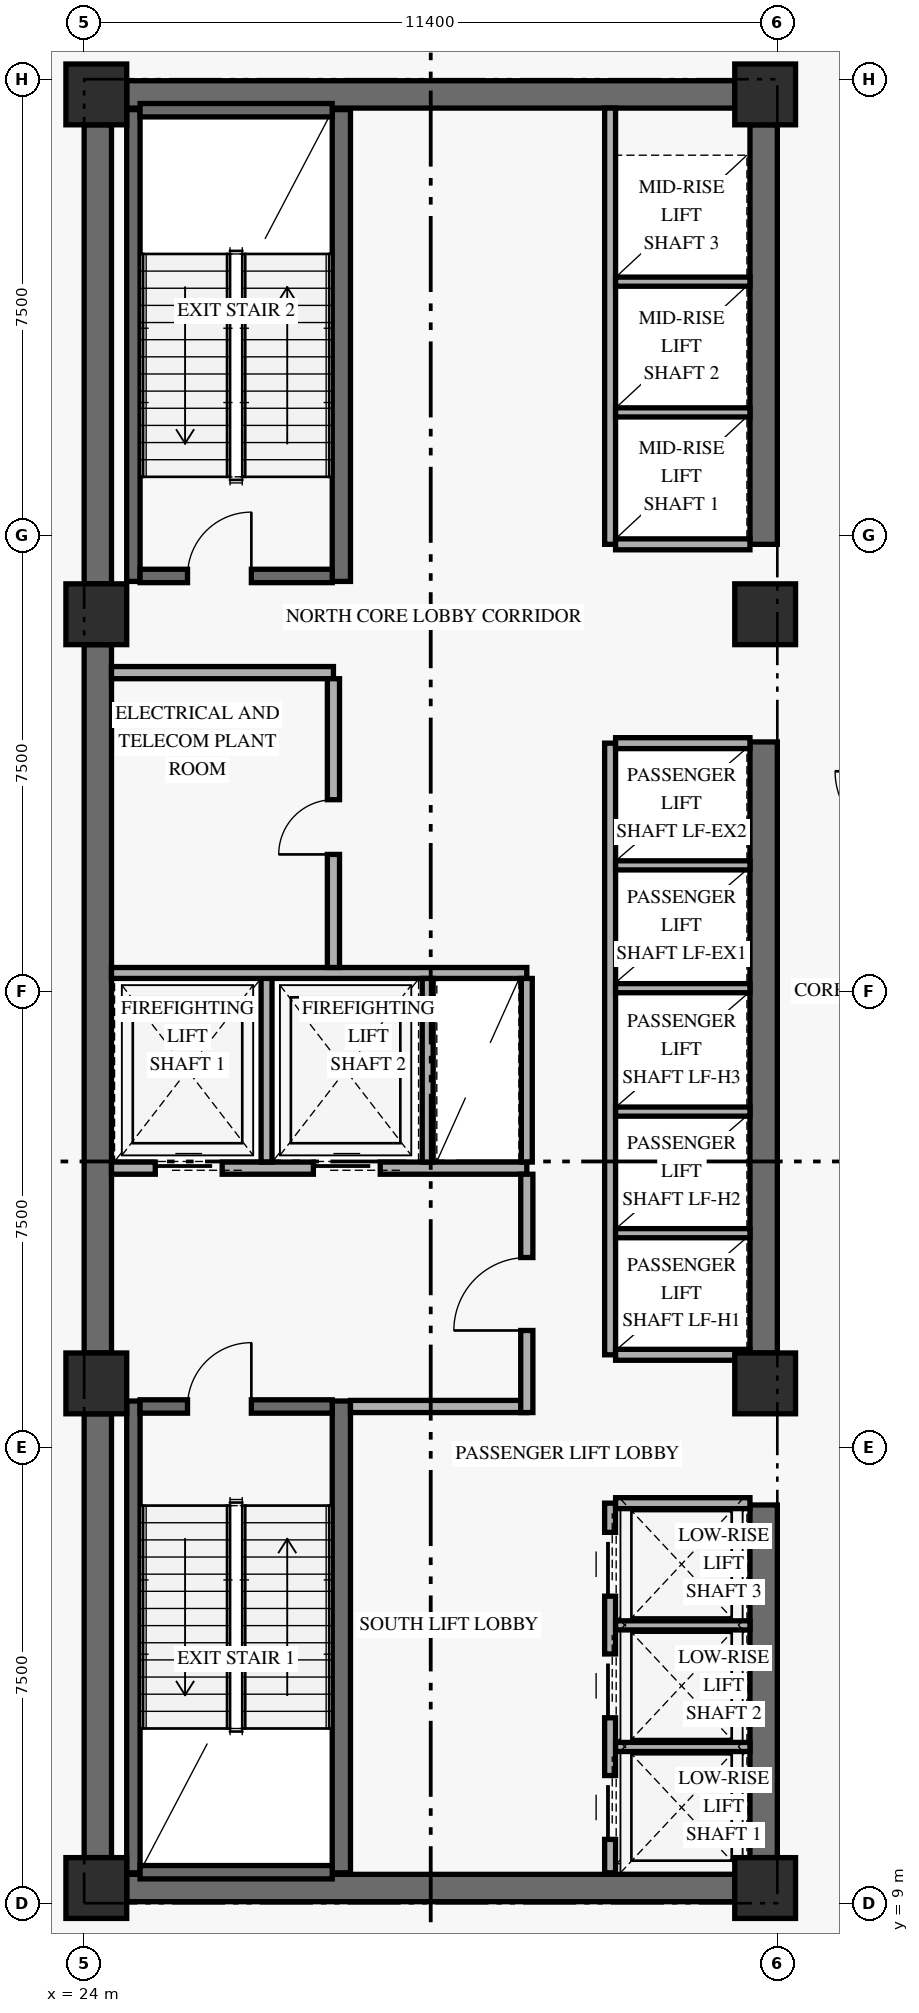
"""IFC4 building model, lengths in metres.
Left out: names, types, materials, properties, quantities, classifications, styles, units other than length and angle.
Written with IfcOpenShell. Run it as: python <this file> out.ifc"""

import sys

from ifc_helpers import new_model, si_unit, direction, frame, frame_2d, origin, origin_2d, place, context, subcontext, project, spatial, rectangle, extrude, element, fill, save


model = new_model("IFC4")
c1 = context("Model", 3, precision=1e-05, world=origin(), true_north=direction((0.0, 1.0)))
c2 = subcontext(c1, "Body", "Model", "MODEL_VIEW")
j1 = project(units=[si_unit("LENGTHUNIT", "METRE"), si_unit("PLANEANGLEUNIT", "RADIAN")], contexts=[c1])
p1 = place(None, origin())
s1 = spatial("IfcSite", under=j1, at=p1, CompositionType="ELEMENT")
p2 = place(p1, origin())
s2 = spatial("IfcBuilding", under=s1, at=p2, CompositionType="ELEMENT")
p3 = place(p2, frame((0.0, 0.0, 19.2)))
s3 = spatial("IfcBuildingStorey", under=s2, at=p3, CompositionType="ELEMENT", Elevation=19.2)
p4 = place(p3, frame((24.225, 9.75, 0.0), z_axis=(0.0, 0.0, 1.0), x_axis=(0.0, 1.0, 0.0)))
e1 = element("IfcWall", 1, at=p4, inside=s3, PredefinedType="SHEAR", context=c2, shape_type="SweptSolid", body=[
    extrude(rectangle(XDim=7.3, YDim=0.45, at=frame_2d((3.65, 0.0))), origin(), (0.0, 0.0, 1.0), 3.73),
])
p5 = place(p3, frame((24.225, 18.05, 0.0), z_axis=(0.0, 0.0, 1.0), x_axis=(0.0, 1.0, 0.0)))
e2 = element("IfcWall", 2, at=p5, inside=s3, PredefinedType="SHEAR", context=c2, shape_type="SweptSolid", body=[
    extrude(rectangle(XDim=11.65, YDim=0.45, at=frame_2d((5.825, 0.0))), origin(), (0.0, 0.0, 1.0), 3.73),
])
p6 = place(p3, frame((24.225, 30.7, 0.0), z_axis=(0.0, 0.0, 1.0), x_axis=(0.0, 1.0, 0.0)))
e3 = element("IfcWall", 3, at=p6, inside=s3, PredefinedType="SHEAR", context=c2, shape_type="SweptSolid", body=[
    extrude(rectangle(XDim=7.55, YDim=0.45, at=frame_2d((3.775, 0.0))), origin(), (0.0, 0.0, 1.0), 3.73),
])
p7 = place(p3, frame((35.175, 9.75, 0.0), z_axis=(0.0, 0.0, 1.0), x_axis=(0.0, 1.0, 0.0)))
e4 = element("IfcWall", 4, at=p7, inside=s3, PredefinedType="SHEAR", context=c2, shape_type="SweptSolid", body=[
    extrude(rectangle(XDim=5.8, YDim=0.45, at=frame_2d((2.9, 0.0))), origin(), (0.0, 0.0, 1.0), 3.73),
])
p8 = place(p3, frame((35.175, 18.05, 0.0), z_axis=(0.0, 0.0, 1.0), x_axis=(0.0, 1.0, 0.0)))
e5 = element("IfcWall", 5, at=p8, inside=s3, PredefinedType="SHEAR", context=c2, shape_type="SweptSolid", body=[
    extrude(rectangle(XDim=10.05, YDim=0.45, at=frame_2d((5.025, 0.0))), origin(), (0.0, 0.0, 1.0), 3.73),
])
p9 = place(p3, frame((35.175, 31.35, 0.0), z_axis=(0.0, 0.0, 1.0), x_axis=(0.0, 1.0, 0.0)))
e6 = element("IfcWall", 6, at=p9, inside=s3, PredefinedType="SHEAR", context=c2, shape_type="SweptSolid", body=[
    extrude(rectangle(XDim=6.9, YDim=0.45, at=frame_2d((3.45, 0.0))), origin(), (0.0, 0.0, 1.0), 3.73),
])
for number, where, z_axis, x_axis in (
    (7, (24.7, 9.25, 0.0), (0.0, 0.0, 1.0), (1.0, 0.0, 0.0)),
    (8, (24.7, 38.75, 0.0), (0.0, 0.0, 1.0), (1.0, 0.0, 0.0)),
):
    element("IfcWall", number, at=place(p3, frame(where, z_axis=z_axis, x_axis=x_axis)), inside=s3, PredefinedType="SHEAR", context=c2, shape_type="SweptSolid", body=[
        extrude(rectangle(XDim=10.0, YDim=0.45, at=frame_2d((5.0, 0.0))), origin(), (0.0, 0.0, 1.0), 4.5),
    ])
p10 = place(p3, frame((24.81, 9.5, 0.0), z_axis=(0.0, 0.0, 1.0), x_axis=(0.0, 1.0, 0.0)))
e9 = element("IfcWall", 9, at=p10, inside=s3, PredefinedType="SHEAR", context=c2, shape_type="SweptSolid", body=[
    extrude(rectangle(XDim=7.76, YDim=0.22, at=frame_2d((3.88, 0.0))), origin(), (0.0, 0.0, 1.0), 4.5),
])
p11 = place(p3, frame((28.23, 9.5, 0.0), z_axis=(0.0, 0.0, 1.0), x_axis=(0.0, 1.0, 0.0)))
e10 = element("IfcWall", 10, at=p11, inside=s3, PredefinedType="SHEAR", context=c2, shape_type="SweptSolid", body=[
    extrude(rectangle(XDim=7.76, YDim=0.3, at=frame_2d((3.88, 0.0))), origin(), (0.0, 0.0, 1.0), 4.5),
])
p12 = place(p3, frame((24.92, 9.51, 0.0), z_axis=(0.0, 0.0, 1.0), x_axis=(1.0, 0.0, 0.0)))
e11 = element("IfcWall", 11, at=p12, inside=s3, PredefinedType="SHEAR", context=c2, shape_type="SweptSolid", body=[
    extrude(rectangle(XDim=3.16, YDim=0.22, at=frame_2d((1.58, 0.0))), origin(), (0.0, 0.0, 1.0), 4.5),
])
p13 = place(p3, frame((24.92, 17.17, 0.0), z_axis=(0.0, 0.0, 1.0), x_axis=(1.0, 0.0, 0.0)))
e12 = element("IfcWall", 12, at=p13, inside=s3, PredefinedType="SHEAR", context=c2, shape_type="SweptSolid", body=[
    extrude(rectangle(XDim=3.16, YDim=0.22, at=frame_2d((1.58, 0.0))), origin(), (0.0, 0.0, 1.0), 4.5),
])
p14 = place(p13, frame((0.78, 0.0, 0.0)))
e13 = element("IfcOpeningElement", 13, at=p14, cuts=e12, PredefinedType="OPENING", context=c2, shape_type="SweptSolid", body=[
    extrude(rectangle(XDim=1.05, YDim=2.15, at=frame_2d((0.525, 1.075))), frame((0.0, 0.12, 0.0), z_axis=(0.0, -1.0, 0.0), x_axis=(1.0, 0.0, 0.0)), (0.0, 0.0, 1.0), 0.24),
])
p15 = place(p3, frame((24.81, 30.74, 0.0), z_axis=(0.0, 0.0, 1.0), x_axis=(0.0, 1.0, 0.0)))
e14 = element("IfcWall", 14, at=p15, inside=s3, PredefinedType="SHEAR", context=c2, shape_type="SweptSolid", body=[
    extrude(rectangle(XDim=7.76, YDim=0.22, at=frame_2d((3.88, 0.0))), origin(), (0.0, 0.0, 1.0), 4.5),
])
p16 = place(p3, frame((28.23, 30.74, 0.0), z_axis=(0.0, 0.0, 1.0), x_axis=(0.0, 1.0, 0.0)))
e15 = element("IfcWall", 15, at=p16, inside=s3, PredefinedType="SHEAR", context=c2, shape_type="SweptSolid", body=[
    extrude(rectangle(XDim=7.76, YDim=0.3, at=frame_2d((3.88, 0.0))), origin(), (0.0, 0.0, 1.0), 4.5),
])
p17 = place(p3, frame((24.92, 30.83, 0.0), z_axis=(0.0, 0.0, 1.0), x_axis=(1.0, 0.0, 0.0)))
e16 = element("IfcWall", 16, at=p17, inside=s3, PredefinedType="SHEAR", context=c2, shape_type="SweptSolid", body=[
    extrude(rectangle(XDim=3.16, YDim=0.22, at=frame_2d((1.58, 0.0))), origin(), (0.0, 0.0, 1.0), 4.5),
])
p18 = place(p17, frame((0.78, 0.0, 0.0)))
e17 = element("IfcOpeningElement", 17, at=p18, cuts=e16, PredefinedType="OPENING", context=c2, shape_type="SweptSolid", body=[
    extrude(rectangle(XDim=1.05, YDim=2.15, at=frame_2d((0.525, 1.075))), frame((0.0, 0.12, 0.0), z_axis=(0.0, -1.0, 0.0), x_axis=(1.0, 0.0, 0.0)), (0.0, 0.0, 1.0), 0.24),
])
p19 = place(p3, frame((24.92, 38.49, 0.0), z_axis=(0.0, 0.0, 1.0), x_axis=(1.0, 0.0, 0.0)))
e18 = element("IfcWall", 18, at=p19, inside=s3, PredefinedType="SHEAR", context=c2, shape_type="SweptSolid", body=[
    extrude(rectangle(XDim=3.16, YDim=0.22, at=frame_2d((1.58, 0.0))), origin(), (0.0, 0.0, 1.0), 4.5),
])
for number, where, z_axis, x_axis in (
    (19, (24.2, 9.25, 0.0), (0.0, 0.0, 1.0), (1.0, 0.0, 0.0)),
    (20, (24.2, 17.55, 0.0), (0.0, 0.0, 1.0), (1.0, 0.0, 0.0)),
    (21, (24.2, 30.2, 0.0), (0.0, 0.0, 1.0), (1.0, 0.0, 0.0)),
    (22, (24.2, 38.75, 0.0), (0.0, 0.0, 1.0), (1.0, 0.0, 0.0)),
    (23, (35.2, 9.25, 0.0), (0.0, 0.0, 1.0), (1.0, 0.0, 0.0)),
    (24, (35.2, 17.55, 0.0), (0.0, 0.0, 1.0), (1.0, 0.0, 0.0)),
    (25, (35.2, 30.2, 0.0), (0.0, 0.0, 1.0), (1.0, 0.0, 0.0)),
    (26, (35.2, 38.75, 0.0), (0.0, 0.0, 1.0), (1.0, 0.0, 0.0)),
):
    element("IfcColumn", number, at=place(p3, frame(where, z_axis=z_axis, x_axis=x_axis)), inside=s3, PredefinedType="COLUMN", context=c2, shape_type="SweptSolid", body=[
        extrude(rectangle(XDim=1.0, YDim=1.0, at=origin_2d()), origin(), (0.0, 0.0, 1.0), 4.8),
    ])
p20 = place(p3, frame((24.45, 21.09, 0.0), z_axis=(0.0, 0.0, 1.0), x_axis=(1.0, 0.0, 0.0)))
e27 = element("IfcWall", 27, at=p20, inside=s3, PredefinedType="STANDARD", context=c2, shape_type="SweptSolid", body=[
    extrude(rectangle(XDim=6.83, YDim=0.2, at=frame_2d((3.415, 0.0))), origin(), (0.0, 0.0, 1.0), 4.5),
])
p21 = place(p20, frame((0.72, 0.0, 0.0)))
e28 = element("IfcOpeningElement", 28, at=p21, cuts=e27, PredefinedType="OPENING", context=c2, shape_type="SweptSolid", body=[
    extrude(rectangle(XDim=1.1, YDim=2.2, at=frame_2d((0.55, 1.1))), frame((0.0, 0.11, 0.0), z_axis=(0.0, -1.0, 0.0), x_axis=(1.0, 0.0, 0.0)), (0.0, 0.0, 1.0), 0.22),
])
p22 = place(p20, frame((3.32, 0.0, 0.0)))
e29 = element("IfcOpeningElement", 29, at=p22, cuts=e27, PredefinedType="OPENING", context=c2, shape_type="SweptSolid", body=[
    extrude(rectangle(XDim=1.1, YDim=2.2, at=frame_2d((0.55, 1.1))), frame((0.0, 0.11, 0.0), z_axis=(0.0, -1.0, 0.0), x_axis=(1.0, 0.0, 0.0)), (0.0, 0.0, 1.0), 0.22),
])
p23 = place(p3, frame((28.38, 17.17, 0.0), z_axis=(0.0, 0.0, 1.0), x_axis=(1.0, 0.0, 0.0)))
e30 = element("IfcWall", 30, at=p23, inside=s3, PredefinedType="STANDARD", context=c2, shape_type="SweptSolid", body=[
    extrude(rectangle(XDim=2.9, YDim=0.2, at=frame_2d((1.45, 0.0))), origin(), (0.0, 0.0, 1.0), 4.5),
])
p24 = place(p3, frame((31.28, 17.07, 0.0), z_axis=(0.0, 0.0, 1.0), x_axis=(0.0, 1.0, 0.0)))
e31 = element("IfcWall", 31, at=p24, inside=s3, PredefinedType="STANDARD", context=c2, shape_type="SweptSolid", body=[
    extrude(rectangle(XDim=3.92, YDim=0.2, at=frame_2d((1.96, 0.0))), origin(), (0.0, 0.0, 1.0), 3.555),
])
p25 = place(p24, frame((1.35, 0.0, 0.0)))
e32 = element("IfcOpeningElement", 32, at=p25, cuts=e31, PredefinedType="OPENING", context=c2, shape_type="SweptSolid", body=[
    extrude(rectangle(XDim=1.2, YDim=2.15, at=frame_2d((0.6, 1.075))), frame((0.0, 0.11, 0.0), z_axis=(0.0, -1.0, 0.0), x_axis=(1.0, 0.0, 0.0)), (0.0, 0.0, 1.0), 0.22),
])
p26 = place(p3, frame((27.0, 21.19, 0.0), z_axis=(0.0, 0.0, 1.0), x_axis=(0.0, 1.0, 0.0)))
e33 = element("IfcWall", 33, at=p26, inside=s3, PredefinedType="STANDARD", context=c2, shape_type="SweptSolid", body=[
    extrude(rectangle(XDim=3.11, YDim=0.18, at=frame_2d((1.555, 0.0))), origin(), (0.0, 0.0, 1.0), 4.5),
])
p27 = place(p3, frame((24.45, 24.3, 0.0), z_axis=(0.0, 0.0, 1.0), x_axis=(1.0, 0.0, 0.0)))
e34 = element("IfcWall", 34, at=p27, inside=s3, PredefinedType="STANDARD", context=c2, shape_type="SweptSolid", body=[
    extrude(rectangle(XDim=6.83, YDim=0.18, at=frame_2d((3.415, 0.0))), origin(), (0.0, 0.0, 1.0), 4.5),
])
for number, where, z_axis, x_axis in (
    (35, (29.65, 21.19, 0.0), (0.0, 0.0, 1.0), (0.0, 1.0, 0.0)),
    (36, (31.28, 21.19, 0.0), (0.0, 0.0, 1.0), (0.0, 1.0, 0.0)),
):
    element("IfcWall", number, at=place(p3, frame(where, z_axis=z_axis, x_axis=x_axis)), inside=s3, PredefinedType="STANDARD", context=c2, shape_type="SweptSolid", body=[
        extrude(rectangle(XDim=3.02, YDim=0.18, at=frame_2d((1.51, 0.0))), origin(), (0.0, 0.0, 1.0), 4.5),
    ])
p28 = place(p3, frame((24.45, 29.24, 0.0), z_axis=(0.0, 0.0, 1.0), x_axis=(1.0, 0.0, 0.0)))
e37 = element("IfcWall", 37, at=p28, inside=s3, PredefinedType="STANDARD", context=c2, shape_type="SweptSolid", body=[
    extrude(rectangle(XDim=3.65, YDim=0.2, at=frame_2d((1.825, 0.0))), origin(), (0.0, 0.0, 1.0), 4.5),
])
p29 = place(p3, frame((28.1, 24.39, 0.0), z_axis=(0.0, 0.0, 1.0), x_axis=(0.0, 1.0, 0.0)))
e38 = element("IfcWall", 38, at=p29, inside=s3, PredefinedType="STANDARD", context=c2, shape_type="SweptSolid", body=[
    extrude(rectangle(XDim=4.75, YDim=0.2, at=frame_2d((2.375, 0.0))), origin(), (0.0, 0.0, 1.0), 4.5),
])
p30 = place(p29, frame((1.86, 0.0, 0.0)))
e39 = element("IfcOpeningElement", 39, at=p30, cuts=e38, PredefinedType="OPENING", context=c2, shape_type="SweptSolid", body=[
    extrude(rectangle(XDim=0.9, YDim=2.1, at=frame_2d((0.45, 1.05))), frame((0.0, 0.11, 0.0), z_axis=(0.0, -1.0, 0.0), x_axis=(1.0, 0.0, 0.0)), (0.0, 0.0, 1.0), 0.22),
])
p31 = place(p3, frame((32.65, 9.5, 0.0), z_axis=(0.0, 0.0, 1.0), x_axis=(0.0, 1.0, 0.0)))
e40 = element("IfcWall", 40, at=p31, inside=s3, PredefinedType="STANDARD", context=c2, shape_type="SweptSolid", body=[
    extrude(rectangle(XDim=6.08, YDim=0.18, at=frame_2d((3.04, 0.0))), origin(), (0.0, 0.0, 1.0), 4.5),
])
p32 = place(p31, frame((0.55, 0.0, 0.0)))
e41 = element("IfcOpeningElement", 41, at=p32, cuts=e40, PredefinedType="OPENING", context=c2, shape_type="SweptSolid", body=[
    extrude(rectangle(XDim=1.05, YDim=2.2, at=frame_2d((0.525, 1.1))), frame((0.0, 0.1, 0.0), z_axis=(0.0, -1.0, 0.0), x_axis=(1.0, 0.0, 0.0)), (0.0, 0.0, 1.0), 0.2),
])
p33 = place(p31, frame((2.55, 0.0, 0.0)))
e42 = element("IfcOpeningElement", 42, at=p33, cuts=e40, PredefinedType="OPENING", context=c2, shape_type="SweptSolid", body=[
    extrude(rectangle(XDim=1.05, YDim=2.2, at=frame_2d((0.525, 1.1))), frame((0.0, 0.1, 0.0), z_axis=(0.0, -1.0, 0.0), x_axis=(1.0, 0.0, 0.0)), (0.0, 0.0, 1.0), 0.2),
])
p34 = place(p31, frame((4.55, 0.0, 0.0)))
e43 = element("IfcOpeningElement", 43, at=p34, cuts=e40, PredefinedType="OPENING", context=c2, shape_type="SweptSolid", body=[
    extrude(rectangle(XDim=1.05, YDim=2.2, at=frame_2d((0.525, 1.1))), frame((0.0, 0.1, 0.0), z_axis=(0.0, -1.0, 0.0), x_axis=(1.0, 0.0, 0.0)), (0.0, 0.0, 1.0), 0.2),
])
p35 = place(p3, frame((32.74, 15.58, 0.0), z_axis=(0.0, 0.0, 1.0), x_axis=(1.0, 0.0, 0.0)))
e44 = element("IfcWall", 44, at=p35, inside=s3, PredefinedType="STANDARD", context=c2, shape_type="SweptSolid", body=[
    extrude(rectangle(XDim=2.21, YDim=0.18, at=frame_2d((1.105, 0.0))), origin(), (0.0, 0.0, 1.0), 4.5),
])
for number, where, z_axis, x_axis in (
    (45, (32.74, 11.57, 0.0), (0.0, 0.0, 1.0), (1.0, 0.0, 0.0)),
    (46, (32.74, 13.57, 0.0), (0.0, 0.0, 1.0), (1.0, 0.0, 0.0)),
):
    element("IfcWall", number, at=place(p3, frame(where, z_axis=z_axis, x_axis=x_axis)), inside=s3, PredefinedType="STANDARD", context=c2, shape_type="SweptSolid", body=[
        extrude(rectangle(XDim=2.21, YDim=0.15, at=frame_2d((1.105, 0.0))), origin(), (0.0, 0.0, 1.0), 4.5),
    ])
p36 = place(p3, frame((32.65, 18.02, 0.0), z_axis=(0.0, 0.0, 1.0), x_axis=(0.0, 1.0, 0.0)))
e47 = element("IfcWall", 47, at=p36, inside=s3, PredefinedType="STANDARD", context=c2, shape_type="SweptSolid", body=[
    extrude(rectangle(XDim=10.06, YDim=0.18, at=frame_2d((5.03, 0.0))), origin(), (0.0, 0.0, 1.0), 4.5),
])
for number, where, z_axis, x_axis in (
    (48, (32.74, 18.02, 0.0), (0.0, 0.0, 1.0), (1.0, 0.0, 0.0)),
    (49, (32.74, 28.08, 0.0), (0.0, 0.0, 1.0), (1.0, 0.0, 0.0)),
):
    element("IfcWall", number, at=place(p3, frame(where, z_axis=z_axis, x_axis=x_axis)), inside=s3, PredefinedType="STANDARD", context=c2, shape_type="SweptSolid", body=[
        extrude(rectangle(XDim=2.21, YDim=0.18, at=frame_2d((1.105, 0.0))), origin(), (0.0, 0.0, 1.0), 4.5),
    ])
for number, where, z_axis, x_axis in (
    (50, (32.74, 20.02, 0.0), (0.0, 0.0, 1.0), (1.0, 0.0, 0.0)),
    (51, (32.74, 22.02, 0.0), (0.0, 0.0, 1.0), (1.0, 0.0, 0.0)),
    (52, (32.74, 24.05, 0.0), (0.0, 0.0, 1.0), (1.0, 0.0, 0.0)),
    (53, (32.74, 26.07, 0.0), (0.0, 0.0, 1.0), (1.0, 0.0, 0.0)),
):
    element("IfcWall", number, at=place(p3, frame(where, z_axis=z_axis, x_axis=x_axis)), inside=s3, PredefinedType="STANDARD", context=c2, shape_type="SweptSolid", body=[
        extrude(rectangle(XDim=2.21, YDim=0.15, at=frame_2d((1.105, 0.0))), origin(), (0.0, 0.0, 1.0), 4.5),
    ])
p37 = place(p3, frame((32.65, 31.35, 0.0), z_axis=(0.0, 0.0, 1.0), x_axis=(0.0, 1.0, 0.0)))
e54 = element("IfcWall", 54, at=p37, inside=s3, PredefinedType="STANDARD", context=c2, shape_type="SweptSolid", body=[
    extrude(rectangle(XDim=7.175, YDim=0.18, at=frame_2d((3.587, 0.0))), origin(), (0.0, 0.0, 1.0), 4.5),
])
p38 = place(p3, frame((32.74, 31.35, 0.0), z_axis=(0.0, 0.0, 1.0), x_axis=(1.0, 0.0, 0.0)))
e55 = element("IfcWall", 55, at=p38, inside=s3, PredefinedType="STANDARD", context=c2, shape_type="SweptSolid", body=[
    extrude(rectangle(XDim=2.21, YDim=0.18, at=frame_2d((1.105, 0.0))), origin(), (0.0, 0.0, 1.0), 4.5),
])
for number, where, z_axis, x_axis in (
    (56, (32.74, 33.52, 0.0), (0.0, 0.0, 1.0), (1.0, 0.0, 0.0)),
    (57, (32.74, 35.67, 0.0), (0.0, 0.0, 1.0), (1.0, 0.0, 0.0)),
):
    element("IfcWall", number, at=place(p3, frame(where, z_axis=z_axis, x_axis=x_axis)), inside=s3, PredefinedType="STANDARD", context=c2, shape_type="SweptSolid", body=[
        extrude(rectangle(XDim=2.21, YDim=0.15, at=frame_2d((1.105, 0.0))), origin(), (0.0, 0.0, 1.0), 4.5),
    ])
p39 = place(p14, frame((1.05, 0.0, 0.0), z_axis=(0.0, 0.0, 1.0), x_axis=(-1.0, 0.0, 0.0)))
e58 = element("IfcDoor", 58, at=p39, inside=s3, OperationType="SINGLE_SWING_LEFT", PredefinedType="DOOR", context=c2, shape_type="SweptSolid", body=[
    extrude(rectangle(XDim=1.05, YDim=2.15, at=frame_2d((0.525, 1.075))), frame((0.0, 0.025, 0.0), z_axis=(0.0, -1.0, 0.0), x_axis=(1.0, 0.0, 0.0)), (0.0, 0.0, 1.0), 0.05),
])
fill(e13, e58)
p40 = place(p18, origin())
e59 = element("IfcDoor", 59, at=p40, inside=s3, OperationType="SINGLE_SWING_RIGHT", PredefinedType="DOOR", context=c2, shape_type="SweptSolid", body=[
    extrude(rectangle(XDim=1.05, YDim=2.15, at=frame_2d((0.525, 1.075))), frame((0.0, 0.025, 0.0), z_axis=(0.0, -1.0, 0.0), x_axis=(1.0, 0.0, 0.0)), (0.0, 0.0, 1.0), 0.05),
])
fill(e17, e59)
p41 = place(p21, origin())
e60 = element("IfcDoor", 60, at=p41, inside=s3, OperationType="SLIDING_TO_LEFT", PredefinedType="DOOR", context=c2, shape_type="SweptSolid", body=[
    extrude(rectangle(XDim=1.1, YDim=2.2, at=frame_2d((0.55, 1.1))), frame((0.0, 0.025, 0.0), z_axis=(0.0, -1.0, 0.0), x_axis=(1.0, 0.0, 0.0)), (0.0, 0.0, 1.0), 0.05),
])
fill(e28, e60)
p42 = place(p22, origin())
e61 = element("IfcDoor", 61, at=p42, inside=s3, OperationType="SLIDING_TO_LEFT", PredefinedType="DOOR", context=c2, shape_type="SweptSolid", body=[
    extrude(rectangle(XDim=1.1, YDim=2.2, at=frame_2d((0.55, 1.1))), frame((0.0, 0.025, 0.0), z_axis=(0.0, -1.0, 0.0), x_axis=(1.0, 0.0, 0.0)), (0.0, 0.0, 1.0), 0.05),
])
fill(e29, e61)
p43 = place(p25, origin())
e62 = element("IfcDoor", 62, at=p43, inside=s3, OperationType="SINGLE_SWING_LEFT", PredefinedType="DOOR", context=c2, shape_type="SweptSolid", body=[
    extrude(rectangle(XDim=1.2, YDim=2.15, at=frame_2d((0.6, 1.075))), frame((0.0, 0.025, 0.0), z_axis=(0.0, -1.0, 0.0), x_axis=(1.0, 0.0, 0.0)), (0.0, 0.0, 1.0), 0.05),
])
fill(e32, e62)
p44 = place(p30, origin())
e63 = element("IfcDoor", 63, at=p44, inside=s3, OperationType="SINGLE_SWING_LEFT", PredefinedType="DOOR", context=c2, shape_type="SweptSolid", body=[
    extrude(rectangle(XDim=0.9, YDim=2.1, at=frame_2d((0.45, 1.05))), frame((0.0, 0.025, 0.0), z_axis=(0.0, -1.0, 0.0), x_axis=(1.0, 0.0, 0.0)), (0.0, 0.0, 1.0), 0.05),
])
fill(e39, e63)
p45 = place(p32, origin())
e64 = element("IfcDoor", 64, at=p45, inside=s3, OperationType="SLIDING_TO_LEFT", PredefinedType="DOOR", context=c2, shape_type="SweptSolid", body=[
    extrude(rectangle(XDim=1.05, YDim=2.2, at=frame_2d((0.525, 1.1))), frame((0.0, 0.025, 0.0), z_axis=(0.0, -1.0, 0.0), x_axis=(1.0, 0.0, 0.0)), (0.0, 0.0, 1.0), 0.05),
])
fill(e41, e64)
p46 = place(p33, origin())
e65 = element("IfcDoor", 65, at=p46, inside=s3, OperationType="SLIDING_TO_LEFT", PredefinedType="DOOR", context=c2, shape_type="SweptSolid", body=[
    extrude(rectangle(XDim=1.05, YDim=2.2, at=frame_2d((0.525, 1.1))), frame((0.0, 0.025, 0.0), z_axis=(0.0, -1.0, 0.0), x_axis=(1.0, 0.0, 0.0)), (0.0, 0.0, 1.0), 0.05),
])
fill(e42, e65)
p47 = place(p34, origin())
e66 = element("IfcDoor", 66, at=p47, inside=s3, OperationType="SLIDING_TO_LEFT", PredefinedType="DOOR", context=c2, shape_type="SweptSolid", body=[
    extrude(rectangle(XDim=1.05, YDim=2.2, at=frame_2d((0.525, 1.1))), frame((0.0, 0.025, 0.0), z_axis=(0.0, -1.0, 0.0), x_axis=(1.0, 0.0, 0.0)), (0.0, 0.0, 1.0), 0.05),
])
fill(e43, e66)
save(model, sys.argv[1])
